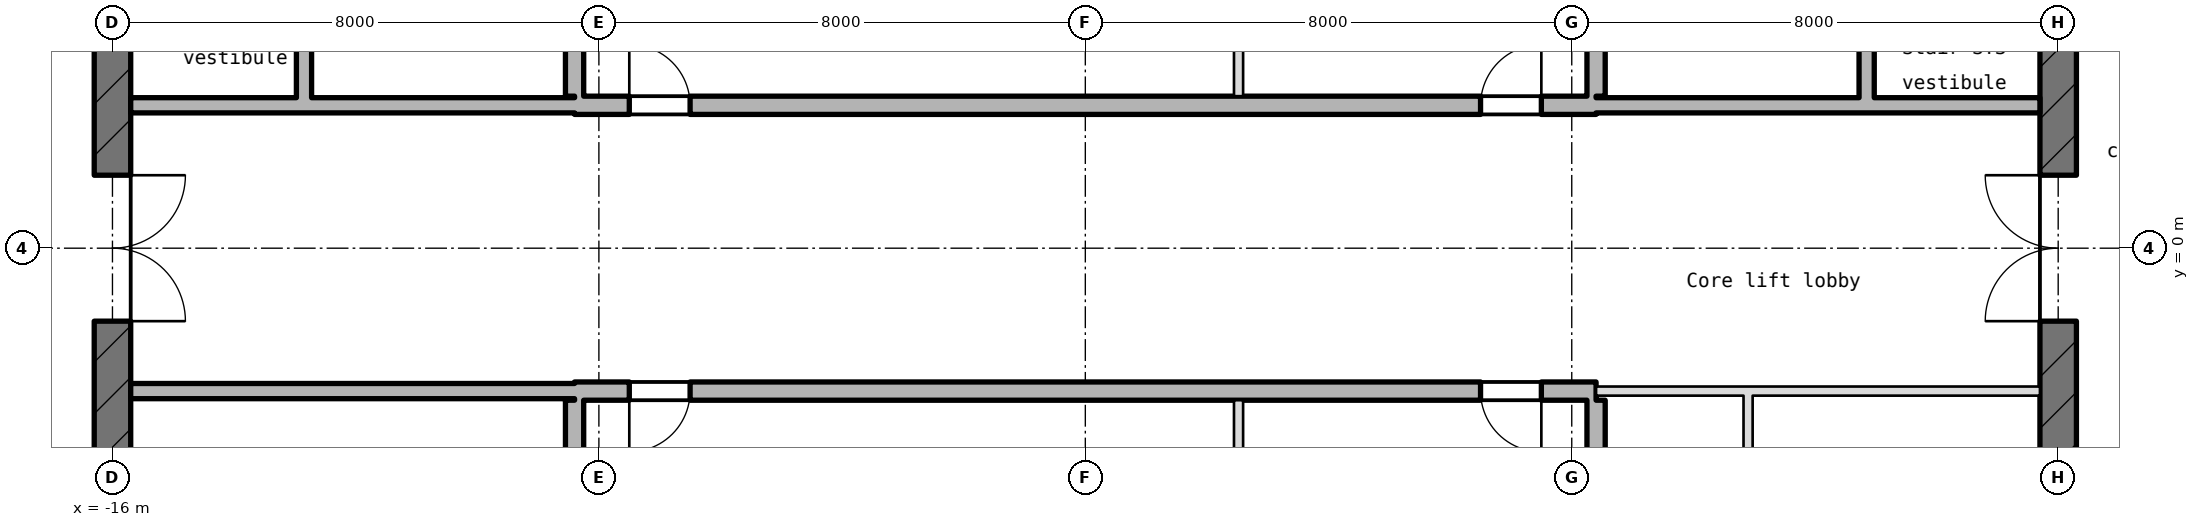
"""IFC4 building model, lengths in metres.
Left out: names, types, materials, properties, quantities, classifications, styles, units other than length and angle.
Written with IfcOpenShell. Run it as: python <this file> out.ifc"""

import sys

from ifc_helpers import new_model, si_unit, direction, frame, frame_2d, origin, place, context, subcontext, project, spatial, rectangle, extrude, element, fill, save


model = new_model("IFC4")
c1 = context("Model", 3, precision=1e-05, world=origin(), true_north=direction((0.0, 1.0)))
c2 = subcontext(c1, "Body", "Model", "MODEL_VIEW")
j1 = project(units=[si_unit("LENGTHUNIT", "METRE"), si_unit("PLANEANGLEUNIT", "RADIAN")], contexts=[c1])
p1 = place(None, origin())
s1 = spatial("IfcSite", under=j1, at=p1, CompositionType="ELEMENT")
p2 = place(p1, origin())
s2 = spatial("IfcBuilding", under=s1, at=p2, CompositionType="ELEMENT")
p3 = place(p2, frame((0.0, 0.0, 413.55)))
s3 = spatial("IfcBuildingStorey", under=s2, at=p3, CompositionType="ELEMENT", Elevation=413.55)
p4 = place(p3, frame((16.0, -10.124, -0.2), z_axis=(0.0, 0.0, 1.0), x_axis=(0.0, 1.0, 0.0)))
e1 = element("IfcWall", 1, at=p4, inside=s3, PredefinedType="SHEAR", context=c2, shape_type="SweptSolid", body=[
    extrude(rectangle(XDim=20.249, YDim=0.6, at=frame_2d((10.124, 0.0))), origin(), (0.0, 0.0, 1.0), 5.0),
])
p5 = place(p4, frame((8.924, 0.0, 0.2)))
e2 = element("IfcOpeningElement", 2, at=p5, cuts=e1, PredefinedType="OPENING", context=c2, shape_type="SweptSolid", body=[
    extrude(rectangle(XDim=2.4, YDim=2.1, at=frame_2d((1.2, 1.05))), frame((0.0, 0.31, 0.0), z_axis=(0.0, -1.0, 0.0), x_axis=(1.0, 0.0, 0.0)), (0.0, 0.0, 1.0), 0.62),
])
p6 = place(p4, frame((13.524, 0.0, 0.2)))
e3 = element("IfcOpeningElement", 3, at=p6, cuts=e1, PredefinedType="OPENING", context=c2, shape_type="SweptSolid", body=[
    extrude(rectangle(XDim=1.2, YDim=2.1, at=frame_2d((0.6, 1.05))), frame((0.0, 0.31, 0.0), z_axis=(0.0, -1.0, 0.0), x_axis=(1.0, 0.0, 0.0)), (0.0, 0.0, 1.0), 0.62),
])
p7 = place(p3, frame((-16.0, 10.124, -0.2), z_axis=(0.0, 0.0, 1.0), x_axis=(0.0, -1.0, 0.0)))
e4 = element("IfcWall", 4, at=p7, inside=s3, PredefinedType="SHEAR", context=c2, shape_type="SweptSolid", body=[
    extrude(rectangle(XDim=20.249, YDim=0.6, at=frame_2d((10.124, 0.0))), origin(), (0.0, 0.0, 1.0), 5.0),
])
p8 = place(p7, frame((8.924, 0.0, 0.2)))
e5 = element("IfcOpeningElement", 5, at=p8, cuts=e4, PredefinedType="OPENING", context=c2, shape_type="SweptSolid", body=[
    extrude(rectangle(XDim=2.4, YDim=2.1, at=frame_2d((1.2, 1.05))), frame((0.0, 0.31, 0.0), z_axis=(0.0, -1.0, 0.0), x_axis=(1.0, 0.0, 0.0)), (0.0, 0.0, 1.0), 0.62),
])
p9 = place(p7, frame((5.524, 0.0, 0.2)))
e6 = element("IfcOpeningElement", 6, at=p9, cuts=e4, PredefinedType="OPENING", context=c2, shape_type="SweptSolid", body=[
    extrude(rectangle(XDim=1.2, YDim=2.1, at=frame_2d((0.6, 1.05))), frame((0.0, 0.31, 0.0), z_axis=(0.0, -1.0, 0.0), x_axis=(1.0, 0.0, 0.0)), (0.0, 0.0, 1.0), 0.62),
])
p10 = place(p3, frame((-15.7, -2.35, 0.0), z_axis=(0.0, 0.0, 1.0), x_axis=(1.0, 0.0, 0.0)))
e7 = element("IfcWall", 7, at=p10, inside=s3, PredefinedType="STANDARD", context=c2, shape_type="SweptSolid", body=[
    extrude(rectangle(XDim=7.3, YDim=0.25, at=frame_2d((3.65, 0.0))), origin(), (0.0, 0.0, 1.0), 4.8),
])
p11 = place(p3, frame((-8.4, -2.35, -0.2), z_axis=(0.0, 0.0, 1.0), x_axis=(1.0, 0.0, 0.0)))
e8 = element("IfcWall", 8, at=p11, inside=s3, PredefinedType="SHEAR", context=c2, shape_type="SweptSolid", body=[
    extrude(rectangle(XDim=16.8, YDim=0.3, at=frame_2d((8.4, 0.0))), origin(), (0.0, 0.0, 1.0), 5.0),
])
p12 = place(p11, frame((0.9, 0.0, 0.2)))
e9 = element("IfcOpeningElement", 9, at=p12, cuts=e8, PredefinedType="OPENING", context=c2, shape_type="SweptSolid", body=[
    extrude(rectangle(XDim=1.0, YDim=2.1, at=frame_2d((0.5, 1.05))), frame((0.0, 0.16, 0.0), z_axis=(0.0, -1.0, 0.0), x_axis=(1.0, 0.0, 0.0)), (0.0, 0.0, 1.0), 0.32),
])
p13 = place(p11, frame((14.9, 0.0, 0.2)))
e10 = element("IfcOpeningElement", 10, at=p13, cuts=e8, PredefinedType="OPENING", context=c2, shape_type="SweptSolid", body=[
    extrude(rectangle(XDim=1.0, YDim=2.1, at=frame_2d((0.5, 1.05))), frame((0.0, 0.16, 0.0), z_axis=(0.0, -1.0, 0.0), x_axis=(1.0, 0.0, 0.0)), (0.0, 0.0, 1.0), 0.32),
])
p14 = place(p3, frame((8.4, -2.35, 0.0), z_axis=(0.0, 0.0, 1.0), x_axis=(1.0, 0.0, 0.0)))
e11 = element("IfcWall", 11, at=p14, inside=s3, PredefinedType="PARTITIONING", context=c2, shape_type="SweptSolid", body=[
    extrude(rectangle(XDim=7.3, YDim=0.15, at=frame_2d((3.65, 0.0))), origin(), (0.0, 0.0, 1.0), 4.8),
])
p15 = place(p3, frame((-15.7, 2.35, 0.0), z_axis=(0.0, 0.0, 1.0), x_axis=(1.0, 0.0, 0.0)))
e12 = element("IfcWall", 12, at=p15, inside=s3, PredefinedType="STANDARD", context=c2, shape_type="SweptSolid", body=[
    extrude(rectangle(XDim=7.3, YDim=0.25, at=frame_2d((3.65, 0.0))), origin(), (0.0, 0.0, 1.0), 4.8),
])
p16 = place(p3, frame((-8.4, 2.35, -0.2), z_axis=(0.0, 0.0, 1.0), x_axis=(1.0, 0.0, 0.0)))
e13 = element("IfcWall", 13, at=p16, inside=s3, PredefinedType="SHEAR", context=c2, shape_type="SweptSolid", body=[
    extrude(rectangle(XDim=16.8, YDim=0.3, at=frame_2d((8.4, 0.0))), origin(), (0.0, 0.0, 1.0), 5.0),
])
p17 = place(p16, frame((0.9, 0.0, 0.2)))
e14 = element("IfcOpeningElement", 14, at=p17, cuts=e13, PredefinedType="OPENING", context=c2, shape_type="SweptSolid", body=[
    extrude(rectangle(XDim=1.0, YDim=2.1, at=frame_2d((0.5, 1.05))), frame((0.0, 0.16, 0.0), z_axis=(0.0, -1.0, 0.0), x_axis=(1.0, 0.0, 0.0)), (0.0, 0.0, 1.0), 0.32),
])
p18 = place(p16, frame((14.9, 0.0, 0.2)))
e15 = element("IfcOpeningElement", 15, at=p18, cuts=e13, PredefinedType="OPENING", context=c2, shape_type="SweptSolid", body=[
    extrude(rectangle(XDim=1.0, YDim=2.1, at=frame_2d((0.5, 1.05))), frame((0.0, 0.16, 0.0), z_axis=(0.0, -1.0, 0.0), x_axis=(1.0, 0.0, 0.0)), (0.0, 0.0, 1.0), 0.32),
])
p19 = place(p3, frame((8.4, 2.35, 0.0), z_axis=(0.0, 0.0, 1.0), x_axis=(1.0, 0.0, 0.0)))
e16 = element("IfcWall", 16, at=p19, inside=s3, PredefinedType="STANDARD", context=c2, shape_type="SweptSolid", body=[
    extrude(rectangle(XDim=7.3, YDim=0.25, at=frame_2d((3.65, 0.0))), origin(), (0.0, 0.0, 1.0), 4.8),
])
p20 = place(p3, frame((-12.85, 2.475, 0.0), z_axis=(0.0, 0.0, 1.0), x_axis=(0.0, 1.0, 0.0)))
e17 = element("IfcWall", 17, at=p20, inside=s3, PredefinedType="STANDARD", context=c2, shape_type="SweptSolid", body=[
    extrude(rectangle(XDim=3.05, YDim=0.25, at=frame_2d((1.525, 0.0))), origin(), (0.0, 0.0, 1.0), 4.8),
])
p21 = place(p3, frame((-8.4, -8.75, -0.2), z_axis=(0.0, 0.0, 1.0), x_axis=(0.0, 1.0, 0.0)))
e18 = element("IfcWall", 18, at=p21, inside=s3, PredefinedType="SHEAR", context=c2, shape_type="SweptSolid", body=[
    extrude(rectangle(XDim=6.25, YDim=0.3, at=frame_2d((3.125, 0.0))), origin(), (0.0, 0.0, 1.0), 5.0),
])
p22 = place(p3, frame((-8.4, 2.5, -0.2), z_axis=(0.0, 0.0, 1.0), x_axis=(0.0, 1.0, 0.0)))
e19 = element("IfcWall", 19, at=p22, inside=s3, PredefinedType="SHEAR", context=c2, shape_type="SweptSolid", body=[
    extrude(rectangle(XDim=5.85, YDim=0.3, at=frame_2d((2.925, 0.0))), origin(), (0.0, 0.0, 1.0), 5.0),
])
p23 = place(p3, frame((2.52, -5.24, 0.0), z_axis=(0.0, 0.0, 1.0), x_axis=(0.0, 1.0, 0.0)))
e20 = element("IfcWall", 20, at=p23, inside=s3, PredefinedType="PARTITIONING", context=c2, shape_type="SweptSolid", body=[
    extrude(rectangle(XDim=2.74, YDim=0.15, at=frame_2d((1.37, 0.0))), origin(), (0.0, 0.0, 1.0), 4.8),
])
p24 = place(p3, frame((2.52, 2.5, 0.0), z_axis=(0.0, 0.0, 1.0), x_axis=(0.0, 1.0, 0.0)))
e21 = element("IfcWall", 21, at=p24, inside=s3, PredefinedType="PARTITIONING", context=c2, shape_type="SweptSolid", body=[
    extrude(rectangle(XDim=2.775, YDim=0.15, at=frame_2d((1.387, 0.0))), origin(), (0.0, 0.0, 1.0), 4.8),
])
for number, where, z_axis, x_axis in (
    (22, (8.4, -8.35, -0.2), (0.0, 0.0, 1.0), (0.0, 1.0, 0.0)),
    (23, (8.4, 2.5, -0.2), (0.0, 0.0, 1.0), (0.0, 1.0, 0.0)),
):
    element("IfcWall", number, at=place(p3, frame(where, z_axis=z_axis, x_axis=x_axis)), inside=s3, PredefinedType="SHEAR", context=c2, shape_type="SweptSolid", body=[
        extrude(rectangle(XDim=5.85, YDim=0.3, at=frame_2d((2.925, 0.0))), origin(), (0.0, 0.0, 1.0), 5.0),
    ])
p25 = place(p3, frame((10.9, -12.7, 0.0), z_axis=(0.0, 0.0, 1.0), x_axis=(0.0, 1.0, 0.0)))
e24 = element("IfcWall", 24, at=p25, inside=s3, PredefinedType="PARTITIONING", context=c2, shape_type="SweptSolid", body=[
    extrude(rectangle(XDim=10.275, YDim=0.15, at=frame_2d((5.137, 0.0))), origin(), (0.0, 0.0, 1.0), 4.8),
])
p26 = place(p25, frame((7.925, 0.0, 0.0)))
e25 = element("IfcOpeningElement", 25, at=p26, cuts=e24, PredefinedType="OPENING", context=c2, shape_type="SweptSolid", body=[
    extrude(rectangle(XDim=1.0, YDim=2.1, at=frame_2d((0.5, 1.05))), frame((0.0, 0.085, 0.0), z_axis=(0.0, -1.0, 0.0), x_axis=(1.0, 0.0, 0.0)), (0.0, 0.0, 1.0), 0.17),
])
p27 = place(p25, frame((2.75, 0.0, 0.0)))
e26 = element("IfcOpeningElement", 26, at=p27, cuts=e24, PredefinedType="OPENING", context=c2, shape_type="SweptSolid", body=[
    extrude(rectangle(XDim=1.0, YDim=2.1, at=frame_2d((0.5, 1.05))), frame((0.0, 0.085, 0.0), z_axis=(0.0, -1.0, 0.0), x_axis=(1.0, 0.0, 0.0)), (0.0, 0.0, 1.0), 0.17),
])
p28 = place(p3, frame((12.85, 2.475, 0.0), z_axis=(0.0, 0.0, 1.0), x_axis=(0.0, 1.0, 0.0)))
e27 = element("IfcWall", 27, at=p28, inside=s3, PredefinedType="STANDARD", context=c2, shape_type="SweptSolid", body=[
    extrude(rectangle(XDim=3.05, YDim=0.25, at=frame_2d((1.525, 0.0))), origin(), (0.0, 0.0, 1.0), 4.8),
])
p29 = place(p8, origin())
e28 = element("IfcDoor", 28, at=p29, inside=s3, OperationType="DOUBLE_DOOR_SINGLE_SWING", PredefinedType="DOOR", context=c2, shape_type="SweptSolid", body=[
    extrude(rectangle(XDim=2.4, YDim=2.1, at=frame_2d((1.2, 1.05))), frame((0.0, 0.025, 0.0), z_axis=(0.0, -1.0, 0.0), x_axis=(1.0, 0.0, 0.0)), (0.0, 0.0, 1.0), 0.05),
])
fill(e5, e28)
p30 = place(p5, origin())
e29 = element("IfcDoor", 29, at=p30, inside=s3, OperationType="DOUBLE_DOOR_SINGLE_SWING", PredefinedType="DOOR", context=c2, shape_type="SweptSolid", body=[
    extrude(rectangle(XDim=2.4, YDim=2.1, at=frame_2d((1.2, 1.05))), frame((0.0, 0.025, 0.0), z_axis=(0.0, -1.0, 0.0), x_axis=(1.0, 0.0, 0.0)), (0.0, 0.0, 1.0), 0.05),
])
fill(e2, e29)
p31 = place(p17, origin())
e30 = element("IfcDoor", 30, at=p31, inside=s3, OperationType="SINGLE_SWING_RIGHT", PredefinedType="DOOR", context=c2, shape_type="SweptSolid", body=[
    extrude(rectangle(XDim=1.0, YDim=2.1, at=frame_2d((0.5, 1.05))), frame((0.0, 0.025, 0.0), z_axis=(0.0, -1.0, 0.0), x_axis=(1.0, 0.0, 0.0)), (0.0, 0.0, 1.0), 0.05),
])
fill(e14, e30)
p32 = place(p18, origin())
e31 = element("IfcDoor", 31, at=p32, inside=s3, OperationType="SINGLE_SWING_RIGHT", PredefinedType="DOOR", context=c2, shape_type="SweptSolid", body=[
    extrude(rectangle(XDim=1.0, YDim=2.1, at=frame_2d((0.5, 1.05))), frame((0.0, 0.025, 0.0), z_axis=(0.0, -1.0, 0.0), x_axis=(1.0, 0.0, 0.0)), (0.0, 0.0, 1.0), 0.05),
])
fill(e15, e31)
p33 = place(p12, frame((1.0, 0.0, 0.0), z_axis=(0.0, 0.0, 1.0), x_axis=(-1.0, 0.0, 0.0)))
e32 = element("IfcDoor", 32, at=p33, inside=s3, OperationType="SINGLE_SWING_LEFT", PredefinedType="DOOR", context=c2, shape_type="SweptSolid", body=[
    extrude(rectangle(XDim=1.0, YDim=2.1, at=frame_2d((0.5, 1.05))), frame((0.0, 0.025, 0.0), z_axis=(0.0, -1.0, 0.0), x_axis=(1.0, 0.0, 0.0)), (0.0, 0.0, 1.0), 0.05),
])
fill(e9, e32)
p34 = place(p13, frame((1.0, 0.0, 0.0), z_axis=(0.0, 0.0, 1.0), x_axis=(-1.0, 0.0, 0.0)))
e33 = element("IfcDoor", 33, at=p34, inside=s3, OperationType="SINGLE_SWING_LEFT", PredefinedType="DOOR", context=c2, shape_type="SweptSolid", body=[
    extrude(rectangle(XDim=1.0, YDim=2.1, at=frame_2d((0.5, 1.05))), frame((0.0, 0.025, 0.0), z_axis=(0.0, -1.0, 0.0), x_axis=(1.0, 0.0, 0.0)), (0.0, 0.0, 1.0), 0.05),
])
fill(e10, e33)
save(model, sys.argv[1])
